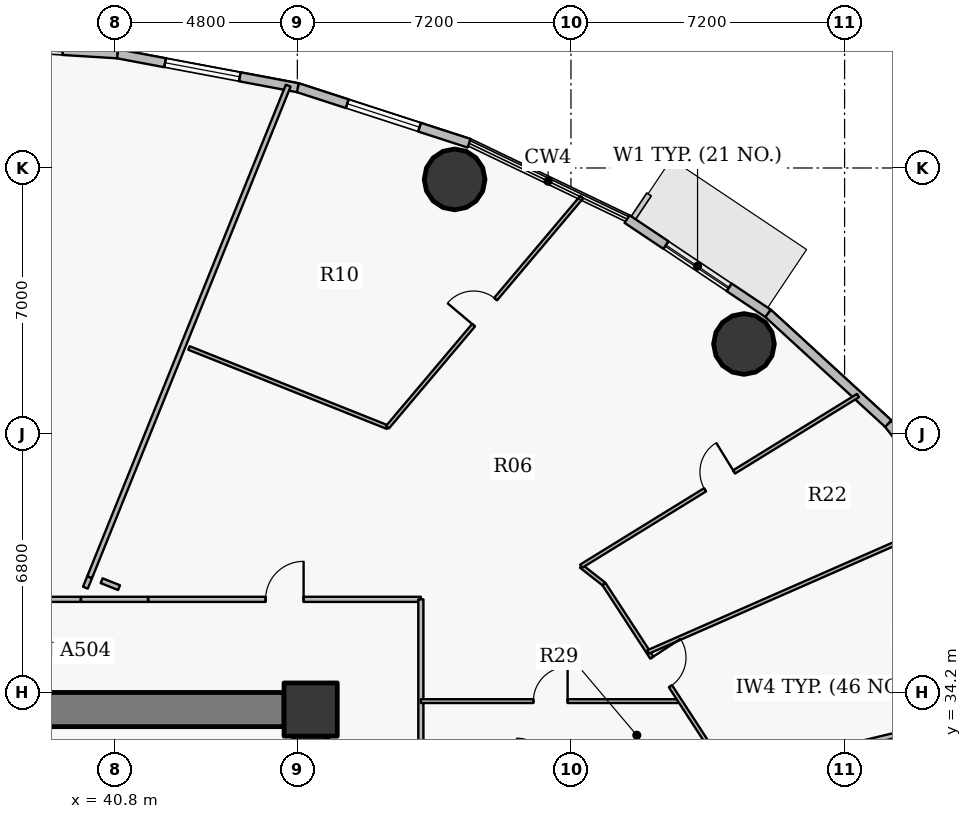
"""IFC4 building model, lengths in metres.
Left out: names, types, materials, properties, quantities, classifications, styles, units other than length and angle.
Written with IfcOpenShell. Run it as: python <this file> out.ifc"""

import sys

from ifc_helpers import new_model, si_unit, direction, frame, frame_2d, origin, origin_2d, place, context, subcontext, project, spatial, rectangle, hollow_circle, extrude, source, transform, mapped, element, fill, save


model = new_model("IFC4")
c1 = context("Model", 3, precision=1e-05, world=origin(), true_north=direction((0.0, 1.0)))
c2 = subcontext(c1, "Body", "Model", "MODEL_VIEW")
j1 = project(units=[si_unit("LENGTHUNIT", "METRE"), si_unit("PLANEANGLEUNIT", "RADIAN")], contexts=[c1])
p1 = place(None, origin())
s1 = spatial("IfcSite", under=j1, at=p1, CompositionType="ELEMENT")
p2 = place(p1, origin())
s2 = spatial("IfcBuilding", under=s1, at=p2, CompositionType="ELEMENT")
p3 = place(p2, frame((0.0, 0.0, 78.6)))
s3 = spatial("IfcBuildingStorey", under=s2, at=p3, CompositionType="ELEMENT", Elevation=78.6)
p4 = place(p3, frame((45.95, 33.75, 0.0), z_axis=(0.0, 0.0, 1.0), x_axis=(1.0, 0.0, 0.0)))
e1 = element("IfcColumn", 1, at=p4, inside=s3, PredefinedType="COLUMN", context=c2, shape_type="SweptSolid", body=[
    extrude(rectangle(XDim=1.4, YDim=1.4, at=origin_2d()), origin(), (0.0, 0.0, 1.0), 4.2),
])
p5 = place(p3, frame((26.75, 33.75, 0.0), z_axis=(0.0, 0.0, 1.0), x_axis=(1.0, 0.0, 0.0)))
e2 = element("IfcWall", 2, at=p5, inside=s3, PredefinedType="SHEAR", context=c2, shape_type="SweptSolid", body=[
    extrude(rectangle(XDim=18.5, YDim=0.9, at=frame_2d((9.25, 0.0))), origin(), (0.0, 0.0, 1.0), 3.4),
])
p6 = place(p3, frame((45.95, 33.05, 0.0), z_axis=(0.0, 0.0, 1.0), x_axis=(0.0, -1.0, 0.0)))
e3 = element("IfcWall", 3, at=p6, inside=s3, PredefinedType="SHEAR", context=c2, shape_type="SweptSolid", body=[
    extrude(rectangle(XDim=12.1, YDim=0.9, at=frame_2d((6.05, 0.0))), origin(), (0.0, 0.0, 1.0), 3.4),
])
p7 = place(p6, frame((5.64, 0.0, 0.0)))
e4 = element("IfcOpeningElement", 4, at=p7, cuts=e3, PredefinedType="OPENING", context=c2, shape_type="SweptSolid", body=[
    extrude(rectangle(XDim=0.82, YDim=2.1, at=origin_2d()), frame((0.41, 0.46, 1.05), z_axis=(0.0, -1.0, 0.0), x_axis=(1.0, 0.0, 0.0)), (0.0, 0.0, 1.0), 0.92),
])
for number, where, z_axis, x_axis in (
    (5, (57.353, 43.369, 0.0), (0.0, 0.0, 1.0), (1.0, 0.0, 0.0)),
    (6, (49.738, 47.699, 0.0), (0.0, 0.0, 1.0), (1.0, 0.0, 0.0)),
):
    element("IfcColumn", number, at=place(p3, frame(where, z_axis=z_axis, x_axis=x_axis)), inside=s3, PredefinedType="COLUMN", context=c2, shape_type="SweptSolid", body=[
        extrude(hollow_circle(Radius=0.8, WallThickness=0.045, at=origin_2d()), origin(), (0.0, 0.0, 1.0), 4.2),
    ])
p8 = place(p3, frame((61.15, 41.275, 0.0), z_axis=(0.0, 0.0, 1.0), x_axis=(0.616295508253, -0.787514981767, 0.0)))
e7 = element("IfcWall", 7, at=p8, inside=s3, PredefinedType="SOLIDWALL", context=c2, shape_type="SweptSolid", body=[
    extrude(rectangle(XDim=4.129, YDim=0.24, at=frame_2d((2.065, 0.0))), origin(), (0.0, 0.0, 1.0), 3.95),
])
p9 = place(p8, frame((0.908, 0.0, 0.9)))
e8 = element("IfcOpeningElement", 8, at=p9, cuts=e7, PredefinedType="OPENING", context=c2, shape_type="SweptSolid", body=[
    extrude(rectangle(XDim=1.6, YDim=1.75, at=origin_2d()), frame((0.8, 0.13, 0.875), z_axis=(0.0, -1.0, 0.0), x_axis=(1.0, 0.0, 0.0)), (0.0, 0.0, 1.0), 0.26),
])
p10 = place(p3, frame((57.985, 44.176, 0.0), z_axis=(0.0, 0.0, 1.0), x_axis=(0.737116376281, -0.67576582321, 0.0)))
e9 = element("IfcWall", 9, at=p10, inside=s3, PredefinedType="SOLIDWALL", context=c2, shape_type="SweptSolid", body=[
    extrude(rectangle(XDim=4.294, YDim=0.24, at=frame_2d((2.147, 0.0))), origin(), (0.0, 0.0, 1.0), 3.95),
])
p11 = place(p3, frame((54.277, 46.656, 0.0), z_axis=(0.0, 0.0, 1.0), x_axis=(0.831240982525, -0.555912249343, 0.0)))
e10 = element("IfcWall", 10, at=p11, inside=s3, PredefinedType="SOLIDWALL", context=c2, shape_type="SweptSolid", body=[
    extrude(rectangle(XDim=4.46, YDim=0.24, at=frame_2d((2.23, 0.0))), origin(), (0.0, 0.0, 1.0), 3.95),
])
p12 = place(p11, frame((1.23, 0.0, 0.9)))
e11 = element("IfcOpeningElement", 11, at=p12, cuts=e10, PredefinedType="OPENING", context=c2, shape_type="SweptSolid", body=[
    extrude(rectangle(XDim=2.0, YDim=1.75, at=origin_2d()), frame((1.0, 0.13, 0.875), z_axis=(0.0, -1.0, 0.0), x_axis=(1.0, 0.0, 0.0)), (0.0, 0.0, 1.0), 0.26),
])
p13 = place(p3, frame((45.611, 50.113, 0.0), z_axis=(0.0, 0.0, 1.0), x_axis=(0.951207699013, -0.308551313946, 0.0)))
e12 = element("IfcWall", 12, at=p13, inside=s3, PredefinedType="SOLIDWALL", context=c2, shape_type="SweptSolid", body=[
    extrude(rectangle(XDim=4.739, YDim=0.24, at=frame_2d((2.369, 0.0))), origin(), (0.0, 0.0, 1.0), 3.95),
])
p14 = place(p13, frame((1.369, 0.0, 0.9)))
e13 = element("IfcOpeningElement", 13, at=p14, cuts=e12, PredefinedType="OPENING", context=c2, shape_type="SweptSolid", body=[
    extrude(rectangle(XDim=2.0, YDim=1.75, at=origin_2d()), frame((1.0, 0.13, 0.875), z_axis=(0.0, -1.0, 0.0), x_axis=(1.0, 0.0, 0.0)), (0.0, 0.0, 1.0), 0.26),
])
p15 = place(p3, frame((40.865, 51.005, 0.0), z_axis=(0.0, 0.0, 1.0), x_axis=(0.982791952378, -0.184715939598, 0.0)))
e14 = element("IfcWall", 14, at=p15, inside=s3, PredefinedType="SOLIDWALL", context=c2, shape_type="SweptSolid", body=[
    extrude(rectangle(XDim=4.828, YDim=0.24, at=frame_2d((2.414, 0.0))), origin(), (0.0, 0.0, 1.0), 3.95),
])
p16 = place(p15, frame((1.277, 0.0, 0.9)))
e15 = element("IfcOpeningElement", 15, at=p16, cuts=e14, PredefinedType="OPENING", context=c2, shape_type="SweptSolid", body=[
    extrude(rectangle(XDim=2.0, YDim=1.75, at=origin_2d()), frame((1.0, 0.13, 0.875), z_axis=(0.0, -1.0, 0.0), x_axis=(1.0, 0.0, 0.0)), (0.0, 0.0, 1.0), 0.26),
])
p17 = place(p3, frame((36.0, 51.305, 0.0), z_axis=(0.0, 0.0, 1.0), x_axis=(0.998106954071, -0.061502099433, 0.0)))
e16 = element("IfcWall", 16, at=p17, inside=s3, PredefinedType="SOLIDWALL", context=c2, shape_type="SweptSolid", body=[
    extrude(rectangle(XDim=4.875, YDim=0.24, at=frame_2d((2.438, 0.0))), origin(), (0.0, 0.0, 1.0), 3.95),
])
p18 = place(p17, frame((1.437, 0.0, 0.9)))
e17 = element("IfcOpeningElement", 17, at=p18, cuts=e16, PredefinedType="OPENING", context=c2, shape_type="SweptSolid", body=[
    extrude(rectangle(XDim=2.0, YDim=1.75, at=origin_2d()), frame((1.0, 0.13, 0.875), z_axis=(0.0, -1.0, 0.0), x_axis=(1.0, 0.0, 0.0)), (0.0, 0.0, 1.0), 0.26),
])
p19 = place(p3, frame((32.101, 36.65, 0.0), z_axis=(0.0, 0.0, 1.0), x_axis=(1.0, 0.0, 0.0)))
e18 = element("IfcWall", 18, at=p19, inside=s3, PredefinedType="PARTITIONING", context=c2, shape_type="SweptSolid", body=[
    extrude(rectangle(XDim=7.798, YDim=0.135, at=frame_2d((3.899, 0.0))), origin(), (0.0, 0.0, 1.0), 3.285),
])
p20 = place(p19, frame((4.25, 0.0, 0.0)))
e19 = element("IfcOpeningElement", 19, at=p20, cuts=e18, PredefinedType="OPENING", context=c2, shape_type="SweptSolid", body=[
    extrude(rectangle(XDim=1.05, YDim=2.15, at=origin_2d()), frame((0.525, 0.078, 1.075), z_axis=(0.0, -1.0, 0.0), x_axis=(1.0, 0.0, 0.0)), (0.0, 0.0, 1.0), 0.155),
])
p21 = place(p19, frame((0.506, 0.0, 0.0)))
e20 = element("IfcOpeningElement", 20, at=p21, cuts=e18, PredefinedType="OPENING", context=c2, shape_type="SweptSolid", body=[
    extrude(rectangle(XDim=0.82, YDim=2.1, at=origin_2d()), frame((0.41, 0.078, 1.05), z_axis=(0.0, -1.0, 0.0), x_axis=(1.0, 0.0, 0.0)), (0.0, 0.0, 1.0), 0.155),
])
p22 = place(p3, frame((40.136, 37.236, 0.0), z_axis=(0.0, 0.0, 1.0), x_axis=(0.374600258899, 0.927186413852, 0.0)))
e21 = element("IfcWall", 21, at=p22, inside=s3, PredefinedType="PARTITIONING", context=c2, shape_type="SweptSolid", body=[
    extrude(rectangle(XDim=13.945, YDim=0.135, at=frame_2d((6.972, 0.0))), origin(), (0.0, 0.0, 1.0), 3.335),
])
p23 = place(p3, frame((41.679, 36.65, 0.0), z_axis=(0.0, 0.0, 1.0), x_axis=(1.0, 0.0, 0.0)))
e22 = element("IfcWall", 22, at=p23, inside=s3, PredefinedType="PARTITIONING", context=c2, shape_type="SweptSolid", body=[
    extrude(rectangle(XDim=7.171, YDim=0.135, at=frame_2d((3.586, 0.0))), origin(), (0.0, 0.0, 1.0), 3.285),
])
p24 = place(p23, frame((3.086, 0.0, 0.0)))
e23 = element("IfcOpeningElement", 23, at=p24, cuts=e22, PredefinedType="OPENING", context=c2, shape_type="SweptSolid", body=[
    extrude(rectangle(XDim=1.0, YDim=2.15, at=origin_2d()), frame((0.5, 0.078, 1.075), z_axis=(0.0, -1.0, 0.0), x_axis=(1.0, 0.0, 0.0)), (0.0, 0.0, 1.0), 0.155),
])
p25 = place(p3, frame((42.749, 43.264, 0.0), z_axis=(0.0, 0.0, 1.0), x_axis=(0.928808679707, -0.370559626107, 0.0)))
e24 = element("IfcWall", 24, at=p25, inside=s3, PredefinedType="PARTITIONING", context=c2, shape_type="SweptSolid", body=[
    extrude(rectangle(XDim=5.623, YDim=0.1, at=frame_2d((2.812, 0.0))), origin(), (0.0, 0.0, 1.0), 3.285),
])
p26 = place(p3, frame((47.972, 41.18, 0.0), z_axis=(0.0, 0.0, 1.0), x_axis=(0.645114462575, 0.764085944234, 0.0)))
e25 = element("IfcWall", 25, at=p26, inside=s3, PredefinedType="PARTITIONING", context=c2, shape_type="SweptSolid", body=[
    extrude(rectangle(XDim=7.923, YDim=0.1, at=frame_2d((3.961, 0.0))), origin(), (0.0, 0.0, 1.0), 3.335),
])
p27 = place(p26, frame((3.511, 0.0, 0.0)))
e26 = element("IfcOpeningElement", 26, at=p27, cuts=e25, PredefinedType="OPENING", context=c2, shape_type="SweptSolid", body=[
    extrude(rectangle(XDim=0.9, YDim=2.1, at=origin_2d()), frame((0.45, 0.06, 1.05), z_axis=(0.0, -1.0, 0.0), x_axis=(1.0, 0.0, 0.0)), (0.0, 0.0, 1.0), 0.12),
])
p28 = place(p3, frame((48.85, 30.638, 0.0), z_axis=(0.0, 0.0, 1.0), x_axis=(0.0, 1.0, 0.0)))
e27 = element("IfcWall", 27, at=p28, inside=s3, PredefinedType="PARTITIONING", context=c2, shape_type="SweptSolid", body=[
    extrude(rectangle(XDim=6.011, YDim=0.135, at=frame_2d((3.006, 0.0))), origin(), (0.0, 0.0, 1.0), 3.285),
])
p29 = place(p3, frame((48.85, 33.972, 0.0), z_axis=(0.0, 0.0, 1.0), x_axis=(1.0, 0.0, 0.0)))
e28 = element("IfcWall", 28, at=p29, inside=s3, PredefinedType="PARTITIONING", context=c2, shape_type="SweptSolid", body=[
    extrude(rectangle(XDim=6.823, YDim=0.1, at=frame_2d((3.412, 0.0))), origin(), (0.0, 0.0, 1.0), 3.95),
])
p30 = place(p29, frame((2.961, 0.0, 0.0)))
e29 = element("IfcOpeningElement", 29, at=p30, cuts=e28, PredefinedType="OPENING", context=c2, shape_type="SweptSolid", body=[
    extrude(rectangle(XDim=0.9, YDim=2.1, at=origin_2d()), frame((0.45, 0.06, 1.05), z_axis=(0.0, -1.0, 0.0), x_axis=(1.0, 0.0, 0.0)), (0.0, 0.0, 1.0), 0.12),
])
p31 = place(p3, frame((49.093, 30.138, 0.0), z_axis=(0.0, 0.0, 1.0), x_axis=(0.972454817416, 0.233091458627, 0.0)))
e30 = element("IfcWall", 30, at=p31, inside=s3, PredefinedType="PARTITIONING", context=c2, shape_type="SweptSolid", body=[
    extrude(rectangle(XDim=17.058, YDim=0.135, at=frame_2d((8.529, 0.0))), origin(), (0.0, 0.0, 1.0), 3.285),
])
p32 = place(p3, frame((53.068, 37.522, 0.0), z_axis=(0.0, 0.0, 1.0), x_axis=(0.787383409887, -0.616463596521, 0.0)))
e31 = element("IfcWall", 31, at=p32, inside=s3, PredefinedType="PARTITIONING", context=c2, shape_type="SweptSolid", body=[
    extrude(rectangle(XDim=0.763, YDim=0.1, at=frame_2d((0.381, 0.0))), origin(), (0.0, 0.0, 1.0), 3.95),
])
p33 = place(p3, frame((53.068, 37.522, 0.0), z_axis=(0.0, 0.0, 1.0), x_axis=(0.851237784686, 0.524780176763, 0.0)))
e32 = element("IfcWall", 32, at=p33, inside=s3, PredefinedType="PARTITIONING", context=c2, shape_type="SweptSolid", body=[
    extrude(rectangle(XDim=8.557, YDim=0.1, at=frame_2d((4.278, 0.0))), origin(), (0.0, 0.0, 1.0), 3.335),
])
p34 = place(p33, frame((3.828, 0.0, 0.0)))
e33 = element("IfcOpeningElement", 33, at=p34, cuts=e32, PredefinedType="OPENING", context=c2, shape_type="SweptSolid", body=[
    extrude(rectangle(XDim=0.9, YDim=2.1, at=origin_2d()), frame((0.45, 0.06, 1.05), z_axis=(0.0, -1.0, 0.0), x_axis=(1.0, 0.0, 0.0)), (0.0, 0.0, 1.0), 0.12),
])
p35 = place(p3, frame((53.669, 37.052, 0.0), z_axis=(0.0, 0.0, 1.0), x_axis=(0.545413765252, -0.8381669432, 0.0)))
e34 = element("IfcWall", 34, at=p35, inside=s3, PredefinedType="PARTITIONING", context=c2, shape_type="SweptSolid", body=[
    extrude(rectangle(XDim=5.688, YDim=0.1, at=frame_2d((2.844, 0.0))), origin(), (0.0, 0.0, 1.0), 3.285),
])
p36 = place(p35, frame((2.308, 0.0, 0.0)))
e35 = element("IfcOpeningElement", 35, at=p36, cuts=e34, PredefinedType="OPENING", context=c2, shape_type="SweptSolid", body=[
    extrude(rectangle(XDim=0.9, YDim=2.1, at=origin_2d()), frame((0.45, 0.06, 1.05), z_axis=(0.0, -1.0, 0.0), x_axis=(1.0, 0.0, 0.0)), (0.0, 0.0, 1.0), 0.12),
])
p37 = place(p3, frame((54.831, 35.266, 0.0), z_axis=(0.0, 0.0, 1.0), x_axis=(0.915674102686, 0.401921556613, 0.0)))
e36 = element("IfcWall", 36, at=p37, inside=s3, PredefinedType="PARTITIONING", context=c2, shape_type="SweptSolid", body=[
    extrude(rectangle(XDim=8.964, YDim=0.1, at=frame_2d((4.482, 0.0))), origin(), (0.0, 0.0, 1.0), 3.335),
])
p38 = place(p3, frame((39.909, 36.65, 0.0), z_axis=(0.0, 0.0, 1.0), x_axis=(1.0, 0.0, 0.0)))
e37 = element("IfcWall", 37, at=p38, inside=s3, PredefinedType="PARTITIONING", context=c2, shape_type="SweptSolid", body=[
    extrude(rectangle(XDim=1.76, YDim=0.135, at=frame_2d((0.88, 0.0))), origin(), (0.0, 0.0, 1.0), 3.95),
])
p39 = place(p3, frame((46.4, 34.2, 0.0), z_axis=(0.0, 0.0, 1.0), x_axis=(-1.0, 0.0, 0.0)))
e38 = element("IfcWall", 38, at=p39, inside=s3, PredefinedType="PARTITIONING", context=c2, shape_type="SweptSolid", body=[
    extrude(rectangle(XDim=1.14, YDim=0.135, at=frame_2d((0.57, 0.0))), origin(), (0.0, 0.0, 1.0), 3.285),
])
p40 = place(p3, frame((46.4, 33.06, 0.0), z_axis=(0.0, 0.0, 1.0), x_axis=(0.0, 1.0, 0.0)))
e39 = element("IfcWall", 39, at=p40, inside=s3, PredefinedType="PARTITIONING", context=c2, shape_type="SweptSolid", body=[
    extrude(rectangle(XDim=0.833, YDim=0.135, at=frame_2d((0.416, 0.0))), origin(), (0.0, 0.0, 1.0), 3.95),
])
p41 = place(p3, frame((40.132, 37.227, 0.0), z_axis=(0.0, 0.0, 1.0), x_axis=(-0.374574137078, -0.927196967118, 0.0)))
e40 = element("IfcWall", 40, at=p41, inside=s3, PredefinedType="PARTITIONING", context=c2, shape_type="SweptSolid", body=[
    extrude(rectangle(XDim=0.291, YDim=0.135, at=frame_2d((0.146, 0.0))), origin(), (0.0, 0.0, 1.0), 3.95),
])
p42 = place(p3, frame((40.908, 36.958, 0.0), z_axis=(0.0, 0.0, 1.0), x_axis=(-0.92881793224, 0.370536433768, 0.0)))
e41 = element("IfcWall", 41, at=p42, inside=s3, PredefinedType="PARTITIONING", context=c2, shape_type="SweptSolid", body=[
    extrude(rectangle(XDim=0.493, YDim=0.135, at=frame_2d((0.247, 0.0))), origin(), (0.0, 0.0, 1.0), 3.95),
])
m1 = source(origin(), c2, "Body", "SweptSolid", [
    extrude(rectangle(XDim=2.0, YDim=1.75, at=origin_2d()), frame((1.0, 0.03, 0.875), z_axis=(0.0, -1.0, 0.0), x_axis=(1.0, 0.0, 0.0)), (0.0, 0.0, 1.0), 0.06),
])
p43 = place(p12, origin())
e42 = element("IfcWindow", 42, at=p43, inside=s3, PartitioningType="DOUBLE_PANEL_VERTICAL", PredefinedType="WINDOW", context=c2, shape_type="MappedRepresentation", body=[
    mapped(m1, transform((0.0, 0.0, 0.0), x_axis=(1.0, 0.0, 0.0), y_axis=(0.0, 1.0, 0.0), z_axis=(0.0, 0.0, 1.0), scale=1.0)),
])
fill(e11, e42)
p44 = place(p14, origin())
e43 = element("IfcWindow", 43, at=p44, inside=s3, PartitioningType="DOUBLE_PANEL_VERTICAL", PredefinedType="WINDOW", context=c2, shape_type="MappedRepresentation", body=[
    mapped(m1, transform((0.0, 0.0, 0.0), x_axis=(1.0, 0.0, 0.0), y_axis=(0.0, 1.0, 0.0), z_axis=(0.0, 0.0, 1.0), scale=1.0)),
])
fill(e13, e43)
p45 = place(p16, origin())
e44 = element("IfcWindow", 44, at=p45, inside=s3, PartitioningType="DOUBLE_PANEL_VERTICAL", PredefinedType="WINDOW", context=c2, shape_type="MappedRepresentation", body=[
    mapped(m1, transform((0.0, 0.0, 0.0), x_axis=(1.0, 0.0, 0.0), y_axis=(0.0, 1.0, 0.0), z_axis=(0.0, 0.0, 1.0), scale=1.0)),
])
fill(e15, e44)
m2 = source(origin(), c2, "Body", "SweptSolid", [
    extrude(rectangle(XDim=1.0, YDim=2.15, at=origin_2d()), frame((0.5, 0.025, 1.075), z_axis=(0.0, -1.0, 0.0), x_axis=(1.0, 0.0, 0.0)), (0.0, 0.0, 1.0), 0.05),
])
p46 = place(p24, origin())
e45 = element("IfcDoor", 45, at=p46, inside=s3, OperationType="SINGLE_SWING_RIGHT", PredefinedType="DOOR", context=c2, shape_type="MappedRepresentation", body=[
    mapped(m2, transform((0.0, 0.0, 0.0), x_axis=(1.0, 0.0, 0.0), y_axis=(0.0, 1.0, 0.0), z_axis=(0.0, 0.0, 1.0), scale=1.0)),
])
fill(e23, e45)
m3 = source(origin(), c2, "Body", "SweptSolid", [
    extrude(rectangle(XDim=0.9, YDim=2.1, at=origin_2d()), frame((0.45, 0.025, 1.05), z_axis=(0.0, -1.0, 0.0), x_axis=(1.0, 0.0, 0.0)), (0.0, 0.0, 1.0), 0.05),
])
p47 = place(p36, origin())
e46 = element("IfcDoor", 46, at=p47, inside=s3, OperationType="SINGLE_SWING_LEFT", PredefinedType="DOOR", context=c2, shape_type="MappedRepresentation", body=[
    mapped(m3, transform((0.0, 0.0, 0.0), x_axis=(1.0, 0.0, 0.0), y_axis=(0.0, 1.0, 0.0), z_axis=(0.0, 0.0, 1.0), scale=1.0)),
])
fill(e35, e46)
p48 = place(p34, origin())
e47 = element("IfcDoor", 47, at=p48, inside=s3, OperationType="SINGLE_SWING_RIGHT", PredefinedType="DOOR", context=c2, shape_type="MappedRepresentation", body=[
    mapped(m3, transform((0.0, 0.0, 0.0), x_axis=(1.0, 0.0, 0.0), y_axis=(0.0, 1.0, 0.0), z_axis=(0.0, 0.0, 1.0), scale=1.0)),
])
fill(e33, e47)
p49 = place(p27, origin())
e48 = element("IfcDoor", 48, at=p49, inside=s3, OperationType="SINGLE_SWING_LEFT", PredefinedType="DOOR", context=c2, shape_type="MappedRepresentation", body=[
    mapped(m3, transform((0.0, 0.0, 0.0), x_axis=(1.0, 0.0, 0.0), y_axis=(0.0, 1.0, 0.0), z_axis=(0.0, 0.0, 1.0), scale=1.0)),
])
fill(e26, e48)
p50 = place(p30, origin())
e49 = element("IfcDoor", 49, at=p50, inside=s3, OperationType="SINGLE_SWING_RIGHT", PredefinedType="DOOR", context=c2, shape_type="MappedRepresentation", body=[
    mapped(m3, transform((0.0, 0.0, 0.0), x_axis=(1.0, 0.0, 0.0), y_axis=(0.0, 1.0, 0.0), z_axis=(0.0, 0.0, 1.0), scale=1.0)),
])
fill(e29, e49)
save(model, sys.argv[1])
